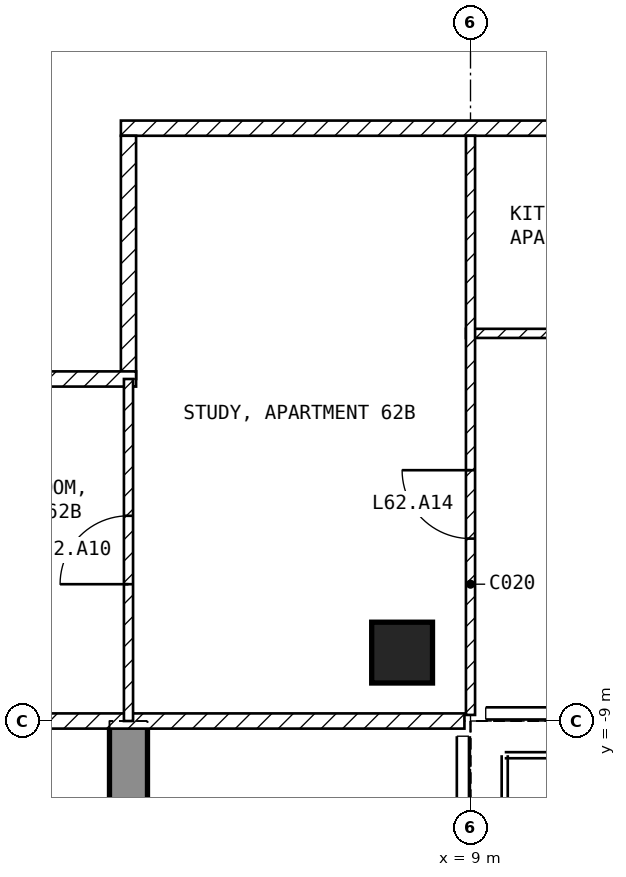
"""IFC4 building model, lengths in metres.
Left out: names, types, materials, properties, quantities, classifications, styles, units other than length and angle.
Written with IfcOpenShell. Run it as: python <this file> out.ifc"""

import sys

from ifc_helpers import new_model, si_unit, direction, frame, frame_2d, origin, origin_2d, place, context, subcontext, project, spatial, polyline, rectangle, outline, extrude, element, fill, save


model = new_model("IFC4")
c1 = context("Model", 3, precision=1e-05, world=origin(), true_north=direction((0.0, 1.0)))
c2 = subcontext(c1, "Body", "Model", "MODEL_VIEW")
j1 = project(units=[si_unit("LENGTHUNIT", "METRE"), si_unit("PLANEANGLEUNIT", "RADIAN")], contexts=[c1])
p1 = place(None, origin())
s1 = spatial("IfcSite", under=j1, at=p1, CompositionType="ELEMENT")
p2 = place(p1, origin())
s2 = spatial("IfcBuilding", under=s1, at=p2, CompositionType="ELEMENT")
p3 = place(p2, frame((0.0, 0.0, 246.5)))
s3 = spatial("IfcBuildingStorey", under=s2, at=p3, CompositionType="ELEMENT", Elevation=246.5)
p4 = place(p3, frame((8.1, -8.1, -0.25), z_axis=(0.0, 0.0, 1.0), x_axis=(1.0, 0.0, 0.0)))
e1 = element("IfcColumn", 1, at=p4, inside=s3, PredefinedType="COLUMN", context=c2, shape_type="SweptSolid", body=[
    extrude(rectangle(XDim=0.8, YDim=0.8, at=origin_2d()), origin(), (0.0, 0.0, 1.0), 3.5),
])
p5 = place(p3, frame((4.25, -16.7, -0.25), z_axis=(1.0, 0.0, 0.0), x_axis=(0.0, 1.0, 0.0)))
e2 = element("IfcWall", 2, at=p5, inside=s3, PredefinedType="SHEAR", context=c2, shape_type="SweptSolid", body=[
    extrude(outline(polyline([(0.0, 0.0), (3.2, 0.0), (3.2, 2.65), (5.6, 2.65), (5.6, 0.0), (7.7, 0.0), (7.7, 3.5), (0.0, 3.5), (0.0, 0.0)])), origin(), (0.0, 0.0, 1.0), 0.5),
])
p6 = place(p3, frame((21.6, -1.2, 0.0), z_axis=(0.0, 0.0, 1.0), x_axis=(-1.0, 0.0, 0.0)))
e3 = element("IfcWall", 3, at=p6, inside=s3, PredefinedType="PARTITIONING", context=c2, shape_type="SweptSolid", body=[
    extrude(rectangle(XDim=17.2, YDim=0.2, at=frame_2d((8.6, 0.0))), origin(), (0.0, 0.0, 1.0), 3.25),
])
p7 = place(p6, frame((7.9, 0.0, 0.0)))
e4 = element("IfcOpeningElement", 4, at=p7, cuts=e3, PredefinedType="OPENING", context=c2, shape_type="SweptSolid", body=[
    extrude(rectangle(XDim=1.0, YDim=2.1, at=frame_2d((0.5, 1.05))), frame((0.0, 0.11, 0.0), z_axis=(0.0, -1.0, 0.0), x_axis=(1.0, 0.0, 0.0)), (0.0, 0.0, 1.0), 0.22),
])
p8 = place(p3, frame((4.5, -1.3, 0.0), z_axis=(0.0, 0.0, 1.0), x_axis=(0.0, -1.0, 0.0)))
e5 = element("IfcWall", 5, at=p8, inside=s3, PredefinedType="PARTITIONING", context=c2, shape_type="SweptSolid", body=[
    extrude(rectangle(XDim=3.2, YDim=0.2, at=frame_2d((1.6, 0.0))), origin(), (0.0, 0.0, 1.0), 3.25),
])
p9 = place(p3, frame((4.6, -4.5, 0.0), z_axis=(0.0, 0.0, 1.0), x_axis=(-1.0, 0.0, 0.0)))
e6 = element("IfcWall", 6, at=p9, inside=s3, PredefinedType="PARTITIONING", context=c2, shape_type="SweptSolid", body=[
    extrude(rectangle(XDim=3.5, YDim=0.2, at=frame_2d((1.75, 0.0))), origin(), (0.0, 0.0, 1.0), 3.25),
])
p10 = place(p3, frame((8.92, -9.0, 0.0), z_axis=(0.0, 0.0, 1.0), x_axis=(-1.0, 0.0, 0.0)))
e7 = element("IfcWall", 7, at=p10, inside=s3, PredefinedType="PARTITIONING", context=c2, shape_type="SweptSolid", body=[
    extrude(rectangle(XDim=17.84, YDim=0.2, at=frame_2d((8.92, 0.0))), origin(), (0.0, 0.0, 1.0), 3.25),
])
p11 = place(p10, frame((8.42, 0.0, 0.0)))
e8 = element("IfcOpeningElement", 8, at=p11, cuts=e7, PredefinedType="OPENING", context=c2, shape_type="SweptSolid", body=[
    extrude(rectangle(XDim=1.0, YDim=2.1, at=frame_2d((0.5, 1.05))), frame((0.0, 0.11, 0.0), z_axis=(0.0, -1.0, 0.0), x_axis=(1.0, 0.0, 0.0)), (0.0, 0.0, 1.0), 0.22),
])
p12 = place(p3, frame((16.8, -3.9, 0.0), z_axis=(0.0, 0.0, 1.0), x_axis=(-1.0, 0.0, 0.0)))
e9 = element("IfcWall", 9, at=p12, inside=s3, PredefinedType="PARTITIONING", context=c2, shape_type="SweptSolid", body=[
    extrude(rectangle(XDim=7.86, YDim=0.12, at=frame_2d((3.93, 0.0))), origin(), (0.0, 0.0, 1.0), 3.25),
])
p13 = place(p12, frame((3.15, 0.0, 0.0)))
e10 = element("IfcOpeningElement", 10, at=p13, cuts=e9, PredefinedType="OPENING", context=c2, shape_type="SweptSolid", body=[
    extrude(rectangle(XDim=0.9, YDim=2.1, at=frame_2d((0.45, 1.05))), frame((0.0, 0.07, 0.0), z_axis=(0.0, -1.0, 0.0), x_axis=(1.0, 0.0, 0.0)), (0.0, 0.0, 1.0), 0.14),
])
p14 = place(p3, frame((9.0, -8.92, 0.0), z_axis=(0.0, 0.0, 1.0), x_axis=(0.0, 1.0, 0.0)))
e11 = element("IfcWall", 11, at=p14, inside=s3, PredefinedType="PARTITIONING", context=c2, shape_type="SweptSolid", body=[
    extrude(rectangle(XDim=7.62, YDim=0.12, at=frame_2d((3.81, 0.0))), origin(), (0.0, 0.0, 1.0), 3.25),
])
p15 = place(p14, frame((2.32, 0.0, 0.0)))
e12 = element("IfcOpeningElement", 12, at=p15, cuts=e11, PredefinedType="OPENING", context=c2, shape_type="SweptSolid", body=[
    extrude(rectangle(XDim=0.9, YDim=2.1, at=frame_2d((0.45, 1.05))), frame((0.0, 0.07, 0.0), z_axis=(0.0, -1.0, 0.0), x_axis=(1.0, 0.0, 0.0)), (0.0, 0.0, 1.0), 0.14),
])
p16 = place(p3, frame((4.5, -9.0, 0.0), z_axis=(0.0, 0.0, 1.0), x_axis=(0.0, 1.0, 0.0)))
e13 = element("IfcWall", 13, at=p16, inside=s3, PredefinedType="PARTITIONING", context=c2, shape_type="SweptSolid", body=[
    extrude(rectangle(XDim=4.5, YDim=0.12, at=frame_2d((2.25, 0.0))), origin(), (0.0, 0.0, 1.0), 3.25),
])
p17 = place(p16, frame((1.8, 0.0, 0.0)))
e14 = element("IfcOpeningElement", 14, at=p17, cuts=e13, PredefinedType="OPENING", context=c2, shape_type="SweptSolid", body=[
    extrude(rectangle(XDim=0.9, YDim=2.1, at=frame_2d((0.45, 1.05))), frame((0.0, 0.07, 0.0), z_axis=(0.0, -1.0, 0.0), x_axis=(1.0, 0.0, 0.0)), (0.0, 0.0, 1.0), 0.14),
])
p18 = place(p17, origin())
e15 = element("IfcDoor", 15, at=p18, inside=s3, OperationType="SINGLE_SWING_LEFT", PredefinedType="DOOR", context=c2, shape_type="SweptSolid", body=[
    extrude(rectangle(XDim=0.9, YDim=2.1, at=frame_2d((0.45, 1.05))), frame((0.0, 0.025, 0.0), z_axis=(0.0, -1.0, 0.0), x_axis=(1.0, 0.0, 0.0)), (0.0, 0.0, 1.0), 0.05),
])
fill(e14, e15)
p19 = place(p15, origin())
e16 = element("IfcDoor", 16, at=p19, inside=s3, OperationType="SINGLE_SWING_RIGHT", PredefinedType="DOOR", context=c2, shape_type="SweptSolid", body=[
    extrude(rectangle(XDim=0.9, YDim=2.1, at=frame_2d((0.45, 1.05))), frame((0.0, 0.025, 0.0), z_axis=(0.0, -1.0, 0.0), x_axis=(1.0, 0.0, 0.0)), (0.0, 0.0, 1.0), 0.05),
])
fill(e12, e16)
save(model, sys.argv[1])
